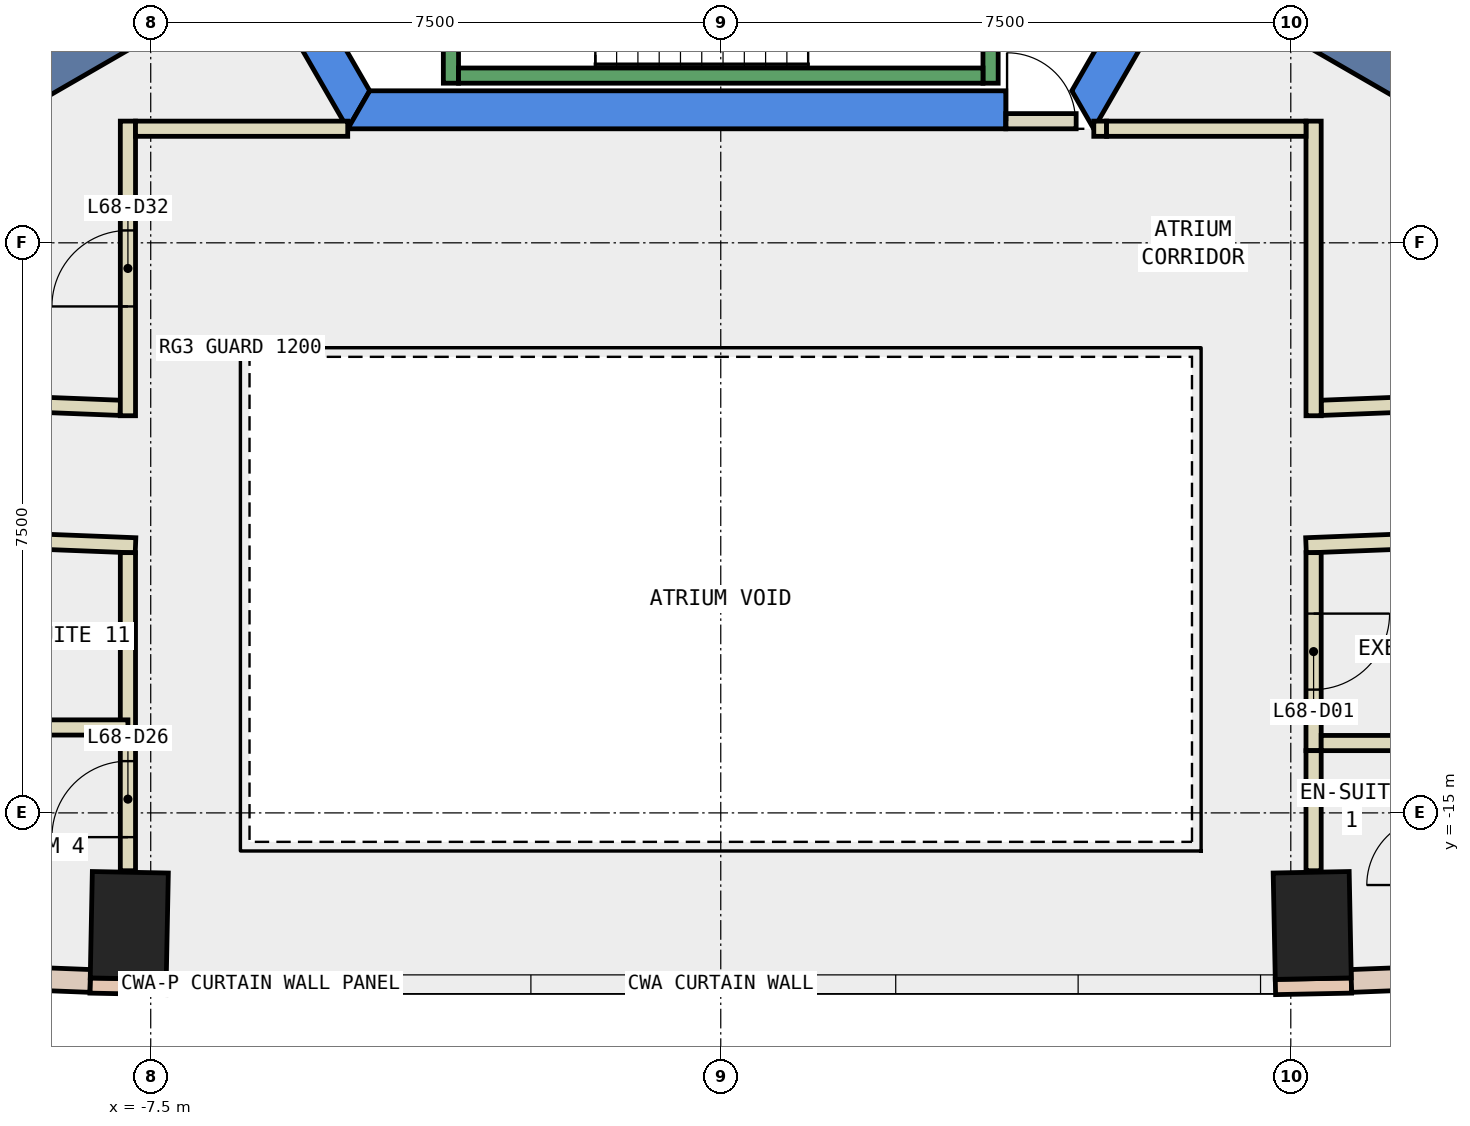
"""IFC4 building model, lengths in metres.
Left out: names, types, materials, properties, quantities, classifications, styles, units other than length and angle.
Written with IfcOpenShell. Run it as: python <this file> out.ifc"""

import sys

from ifc_helpers import new_model, si_unit, direction, frame, frame_2d, origin, origin_2d, place, context, subcontext, project, spatial, polyline, rectangle, outline, extrude, element, fill, save


model = new_model("IFC4")
c1 = context("Model", 3, precision=1e-05, world=origin(), true_north=direction((0.0, 1.0)))
c2 = subcontext(c1, "Body", "Model", "MODEL_VIEW")
j1 = project(units=[si_unit("LENGTHUNIT", "METRE"), si_unit("PLANEANGLEUNIT", "RADIAN")], contexts=[c1])
p1 = place(None, origin())
s1 = spatial("IfcSite", under=j1, at=p1, CompositionType="ELEMENT")
p2 = place(p1, origin())
s2 = spatial("IfcBuilding", under=s1, at=p2, CompositionType="ELEMENT")
p3 = place(p2, frame((0.0, 0.0, 293.6)))
s3 = spatial("IfcBuildingStorey", under=s2, at=p3, CompositionType="ELEMENT", Elevation=293.6)
for number, where, z_axis, x_axis in (
    (1, (-7.782, -16.481, -0.34), (0.0, 0.0, 1.0), (-1.0, 0.02, 0.0)),
    (2, (7.782, -16.481, -0.34), (0.0, 0.0, 1.0), (1.0, 0.02, 0.0)),
):
    element("IfcColumn", number, at=place(p3, frame(where, z_axis=z_axis, x_axis=x_axis)), inside=s3, PredefinedType="COLUMN", context=c2, shape_type="SweptSolid", body=[
        extrude(rectangle(XDim=1.0, YDim=1.4, at=origin_2d()), origin(), (0.0, 0.0, 1.0), 3.6),
    ])
p4 = place(p3, frame((0.0, 0.0, -0.34)))
e3 = element("IfcWall", 3, at=p4, inside=s3, PredefinedType="SHEAR", context=c2, shape_type="SweptSolid", body=[
    extrude(outline(polyline([(-9.815, 2.5), (-4.907, -6.0), (-4.619, -5.5), (-9.238, 2.5), (-9.815, 2.5)])), origin(), (0.0, 0.0, 1.0), 3.6),
])
p5 = place(p3, frame((0.0, 0.0, -0.34)))
e4 = element("IfcWall", 4, at=p5, inside=s3, PredefinedType="SHEAR", context=c2, shape_type="SweptSolid", body=[
    extrude(outline(polyline([(3.75, -6.0), (3.75, -5.5), (-4.619, -5.5), (-4.907, -6.0), (3.75, -6.0)])), origin(), (0.0, 0.0, 1.0), 3.6),
])
p6 = place(p3, frame((0.0, 0.0, -0.34)))
e5 = element("IfcWall", 5, at=p6, inside=s3, PredefinedType="SHEAR", context=c2, shape_type="SweptSolid", body=[
    extrude(outline(polyline([(4.907, -6.0), (9.815, 2.5), (9.238, 2.5), (4.619, -5.5), (4.907, -6.0)])), origin(), (0.0, 0.0, 1.0), 3.6),
])
for number, where, z_axis, x_axis in (
    (6, (6.279, -3.625, -0.34), (0.0, 0.0, 1.0), (0.866, -0.5, 0.0)),
    (7, (-6.279, -3.625, -0.34), (0.0, 0.0, 1.0), (-0.866, -0.5, 0.0)),
):
    element("IfcWall", number, at=place(p3, frame(where, z_axis=z_axis, x_axis=x_axis)), inside=s3, PredefinedType="SHEAR", context=c2, shape_type="SweptSolid", body=[
        extrude(rectangle(XDim=9.0, YDim=0.8, at=frame_2d((4.5, 0.0))), origin(), (0.0, 0.0, 1.0), 3.6),
    ])
for number, where, z_axis, x_axis in (
    (8, (-8.298, -17.271, 0.0), (0.0, 0.0, 1.0), (1.0, -0.02, 0.0)),
    (9, (7.298, -17.291, 0.0), (0.0, 0.0, 1.0), (1.0, 0.02, 0.0)),
):
    element("IfcWall", number, at=place(p3, frame(where, z_axis=z_axis, x_axis=x_axis)), inside=s3, PredefinedType="STANDARD", context=c2, shape_type="SweptSolid", body=[
        extrude(rectangle(XDim=1.0, YDim=0.2, at=frame_2d((0.5, 0.0))), origin(), (0.0, 0.0, 1.0), 3.26),
    ])
p7 = place(p3, frame((-11.92, -17.069, 0.0), z_axis=(0.0, 0.0, 1.0), x_axis=(0.999234893779, -0.039110446866, 0.0)))
e10 = element("IfcWall", 10, at=p7, inside=s3, PredefinedType="STANDARD", context=c2, shape_type="SweptSolid", body=[
    extrude(rectangle(XDim=3.627, YDim=0.3, at=frame_2d((1.813, 0.0))), origin(), (0.0, 0.0, 1.0), 3.26),
])
p8 = place(p7, frame((1.113, 0.0, 0.9)))
e11 = element("IfcOpeningElement", 11, at=p8, cuts=e10, PredefinedType="OPENING", context=c2, shape_type="SweptSolid", body=[
    extrude(rectangle(XDim=1.4, YDim=2.0, at=frame_2d((0.7, 1.0))), frame((0.0, 0.16, 0.0), z_axis=(0.0, -1.0, 0.0), x_axis=(1.0, 0.0, 0.0)), (0.0, 0.0, 1.0), 0.32),
])
p9 = place(p3, frame((8.296, -17.211, 0.0), z_axis=(0.0, 0.0, 1.0), x_axis=(0.999234893779, 0.039110446866, 0.0)))
e12 = element("IfcWall", 12, at=p9, inside=s3, PredefinedType="STANDARD", context=c2, shape_type="SweptSolid", body=[
    extrude(rectangle(XDim=3.627, YDim=0.3, at=frame_2d((1.813, 0.0))), origin(), (0.0, 0.0, 1.0), 3.26),
])
p10 = place(p9, frame((1.113, 0.0, 0.9)))
e13 = element("IfcOpeningElement", 13, at=p10, cuts=e12, PredefinedType="OPENING", context=c2, shape_type="SweptSolid", body=[
    extrude(rectangle(XDim=1.4, YDim=2.0, at=frame_2d((0.7, 1.0))), frame((0.0, 0.16, 0.0), z_axis=(0.0, -1.0, 0.0), x_axis=(1.0, 0.0, 0.0)), (0.0, 0.0, 1.0), 0.32),
])
p11 = place(p3, frame((7.9, -9.671, 0.0), z_axis=(0.0, 0.0, 1.0), x_axis=(0.999223751627, 0.039394088186, 0.0)))
e14 = element("IfcWall", 14, at=p11, inside=s3, PredefinedType="PARTITIONING", context=c2, shape_type="SweptSolid", body=[
    extrude(rectangle(XDim=3.347, YDim=0.2, at=frame_2d((1.673, 0.0))), origin(), (0.0, 0.0, 1.0), 3.26),
])
p12 = place(p3, frame((-10.367, -9.574, 0.0), z_axis=(0.0, 0.0, 1.0), x_axis=(0.999229139158, -0.039257196264, 0.0)))
e15 = element("IfcWall", 15, at=p12, inside=s3, PredefinedType="PARTITIONING", context=c2, shape_type="SweptSolid", body=[
    extrude(rectangle(XDim=2.469, YDim=0.2, at=frame_2d((1.234, 0.0))), origin(), (0.0, 0.0, 1.0), 3.26),
])
p13 = place(p3, frame((11.474, -11.332, 0.0), z_axis=(0.0, 0.0, 1.0), x_axis=(-0.999232546126, -0.039170381199, 0.0)))
e16 = element("IfcWall", 16, at=p13, inside=s3, PredefinedType="PARTITIONING", context=c2, shape_type="SweptSolid", body=[
    extrude(rectangle(XDim=3.777, YDim=0.2, at=frame_2d((1.889, 0.0))), origin(), (0.0, 0.0, 1.0), 3.26),
])
p14 = place(p3, frame((-7.7, -11.48, 0.0), z_axis=(0.0, 0.0, 1.0), x_axis=(-0.999233433291, 0.039147743138, 0.0)))
e17 = element("IfcWall", 17, at=p14, inside=s3, PredefinedType="PARTITIONING", context=c2, shape_type="SweptSolid", body=[
    extrude(rectangle(XDim=2.401, YDim=0.2, at=frame_2d((1.201, 0.0))), origin(), (0.0, 0.0, 1.0), 3.26),
])
p15 = place(p3, frame((4.908, -5.999, 0.0), z_axis=(0.0, 0.0, 1.0), x_axis=(1.0, 0.0, 0.0)))
e18 = element("IfcWall", 18, at=p15, inside=s3, PredefinedType="PARTITIONING", context=c2, shape_type="SweptSolid", body=[
    extrude(rectangle(XDim=0.168, YDim=0.2, at=frame_2d((0.084, 0.0))), origin(), (0.0, 0.0, 1.0), 2.4),
])
p16 = place(p3, frame((7.8, -5.899, 0.0), z_axis=(0.0, 0.0, 1.0), x_axis=(0.0, -1.0, 0.0)))
e19 = element("IfcWall", 19, at=p16, inside=s3, PredefinedType="PARTITIONING", context=c2, shape_type="SweptSolid", body=[
    extrude(rectangle(XDim=3.876, YDim=0.2, at=frame_2d((1.938, 0.0))), origin(), (0.0, 0.0, 1.0), 3.26),
])
p17 = place(p3, frame((-7.8, -9.775, 0.0), z_axis=(0.0, 0.0, 1.0), x_axis=(0.0, 1.0, 0.0)))
e20 = element("IfcWall", 20, at=p17, inside=s3, PredefinedType="PARTITIONING", context=c2, shape_type="SweptSolid", body=[
    extrude(rectangle(XDim=3.876, YDim=0.2, at=frame_2d((1.938, 0.0))), origin(), (0.0, 0.0, 1.0), 3.26),
])
p18 = place(p17, frame((1.438, 0.0, 0.0)))
e21 = element("IfcOpeningElement", 21, at=p18, cuts=e20, PredefinedType="OPENING", context=c2, shape_type="SweptSolid", body=[
    extrude(rectangle(XDim=1.0, YDim=2.1, at=frame_2d((0.5, 1.05))), frame((0.0, 0.11, 0.0), z_axis=(0.0, -1.0, 0.0), x_axis=(1.0, 0.0, 0.0)), (0.0, 0.0, 1.0), 0.22),
])
p19 = place(p3, frame((-7.7, -5.999, 0.0), z_axis=(0.0, 0.0, 1.0), x_axis=(1.0, 0.0, 0.0)))
e22 = element("IfcWall", 22, at=p19, inside=s3, PredefinedType="PARTITIONING", context=c2, shape_type="SweptSolid", body=[
    extrude(rectangle(XDim=2.792, YDim=0.2, at=frame_2d((1.396, 0.0))), origin(), (0.0, 0.0, 1.0), 3.26),
])
p20 = place(p3, frame((7.8, -11.576, 0.0), z_axis=(0.0, 0.0, 1.0), x_axis=(0.0, -1.0, 0.0)))
e23 = element("IfcWall", 23, at=p20, inside=s3, PredefinedType="PARTITIONING", context=c2, shape_type="SweptSolid", body=[
    extrude(rectangle(XDim=2.605, YDim=0.2, at=frame_2d((1.302, 0.0))), origin(), (0.0, 0.0, 1.0), 3.26),
])
p21 = place(p20, frame((0.802, 0.0, 0.0)))
e24 = element("IfcOpeningElement", 24, at=p21, cuts=e23, PredefinedType="OPENING", context=c2, shape_type="SweptSolid", body=[
    extrude(rectangle(XDim=1.0, YDim=2.1, at=frame_2d((0.5, 1.05))), frame((0.0, 0.11, 0.0), z_axis=(0.0, -1.0, 0.0), x_axis=(1.0, 0.0, 0.0)), (0.0, 0.0, 1.0), 0.22),
])
p22 = place(p3, frame((7.8, -14.181, 0.0), z_axis=(0.0, 0.0, 1.0), x_axis=(0.0, -1.0, 0.0)))
e25 = element("IfcWall", 25, at=p22, inside=s3, PredefinedType="PARTITIONING", context=c2, shape_type="SweptSolid", body=[
    extrude(rectangle(XDim=1.58, YDim=0.2, at=frame_2d((0.79, 0.0))), origin(), (0.0, 0.0, 1.0), 3.26),
])
p23 = place(p3, frame((-7.8, -15.761, 0.0), z_axis=(0.0, 0.0, 1.0), x_axis=(0.0, 1.0, 0.0)))
e26 = element("IfcWall", 26, at=p23, inside=s3, PredefinedType="PARTITIONING", context=c2, shape_type="SweptSolid", body=[
    extrude(rectangle(XDim=1.785, YDim=0.2, at=frame_2d((0.893, 0.0))), origin(), (0.0, 0.0, 1.0), 3.26),
])
p24 = place(p23, frame((0.442, 0.0, 0.0)))
e27 = element("IfcOpeningElement", 27, at=p24, cuts=e26, PredefinedType="OPENING", context=c2, shape_type="SweptSolid", body=[
    extrude(rectangle(XDim=1.0, YDim=2.1, at=frame_2d((0.5, 1.05))), frame((0.0, 0.11, 0.0), z_axis=(0.0, -1.0, 0.0), x_axis=(1.0, 0.0, 0.0)), (0.0, 0.0, 1.0), 0.22),
])
p25 = place(p3, frame((-7.8, -13.976, 0.0), z_axis=(0.0, 0.0, 1.0), x_axis=(0.0, 1.0, 0.0)))
e28 = element("IfcWall", 28, at=p25, inside=s3, PredefinedType="PARTITIONING", context=c2, shape_type="SweptSolid", body=[
    extrude(rectangle(XDim=2.4, YDim=0.2, at=frame_2d((1.2, 0.0))), origin(), (0.0, 0.0, 1.0), 3.26),
])
p26 = place(p3, frame((-6.845, -2.643, 0.0), z_axis=(0.0, 0.0, 1.0), x_axis=(-0.865994457699, -0.500053596362, 0.0)))
e29 = element("IfcWall", 29, at=p26, inside=s3, PredefinedType="PARTITIONING", context=c2, shape_type="SweptSolid", body=[
    extrude(rectangle(XDim=6.701, YDim=0.2, at=frame_2d((3.351, 0.0))), origin(), (0.0, 0.0, 1.0), 3.26),
])
p27 = place(p3, frame((9.3, -14.081, 0.0), z_axis=(0.0, 0.0, 1.0), x_axis=(-1.0, 0.0, 0.0)))
e30 = element("IfcWall", 30, at=p27, inside=s3, PredefinedType="PARTITIONING", context=c2, shape_type="SweptSolid", body=[
    extrude(rectangle(XDim=1.4, YDim=0.2, at=frame_2d((0.7, 0.0))), origin(), (0.0, 0.0, 1.0), 3.26),
])
p28 = place(p3, frame((-10.1, -13.876, 0.0), z_axis=(0.0, 0.0, 1.0), x_axis=(1.0, 0.0, 0.0)))
e31 = element("IfcWall", 31, at=p28, inside=s3, PredefinedType="PARTITIONING", context=c2, shape_type="SweptSolid", body=[
    extrude(rectangle(XDim=2.3, YDim=0.2, at=frame_2d((1.15, 0.0))), origin(), (0.0, 0.0, 1.0), 3.26),
])
p29 = place(p3, frame((3.75, -5.9, 0.0), z_axis=(0.0, 0.0, 1.0), x_axis=(1.0, 0.0, 0.0)))
e32 = element("IfcWall", 32, at=p29, inside=s3, PredefinedType="PARTITIONING", context=c2, shape_type="SweptSolid", body=[
    extrude(rectangle(XDim=0.926, YDim=0.2, at=frame_2d((0.463, 0.0))), origin(), (0.0, 0.0, 1.0), 2.4),
])
p30 = place(p29, frame((0.017, 0.0, 0.0)))
e33 = element("IfcOpeningElement", 33, at=p30, cuts=e32, PredefinedType="OPENING", context=c2, shape_type="SweptSolid", body=[
    extrude(rectangle(XDim=0.9, YDim=2.1, at=frame_2d((0.45, 1.05))), frame((0.0, 0.11, 0.0), z_axis=(0.0, -1.0, 0.0), x_axis=(1.0, 0.0, 0.0)), (0.0, 0.0, 1.0), 0.22),
])
p31 = place(p3, frame((5.076, -5.999, 0.0), z_axis=(0.0, 0.0, 1.0), x_axis=(1.0, 0.0, 0.0)))
e34 = element("IfcWall", 34, at=p31, inside=s3, PredefinedType="PARTITIONING", context=c2, shape_type="SweptSolid", body=[
    extrude(rectangle(XDim=2.624, YDim=0.2, at=frame_2d((1.312, 0.0))), origin(), (0.0, 0.0, 1.0), 3.26),
])
p32 = place(p3, frame((-3.55, -1.0, 0.0), z_axis=(0.0, 0.0, 1.0), x_axis=(0.0, -1.0, 0.0)))
e35 = element("IfcWall", 35, at=p32, inside=s3, PredefinedType="STANDARD", context=c2, shape_type="SweptSolid", body=[
    extrude(rectangle(XDim=4.4, YDim=0.2, at=frame_2d((2.2, 0.0))), origin(), (0.0, 0.0, 1.0), 3.26),
])
p33 = place(p32, frame((2.4, 0.0, 0.0)))
e36 = element("IfcOpeningElement", 36, at=p33, cuts=e35, PredefinedType="OPENING", context=c2, shape_type="SweptSolid", body=[
    extrude(rectangle(XDim=1.1, YDim=2.2, at=frame_2d((0.55, 1.1))), frame((0.0, 0.11, 0.0), z_axis=(0.0, -1.0, 0.0), x_axis=(1.0, 0.0, 0.0)), (0.0, 0.0, 1.0), 0.22),
])
p34 = place(p3, frame((3.55, -2.667, 0.0), z_axis=(0.0, 0.0, 1.0), x_axis=(0.0, -1.0, 0.0)))
e37 = element("IfcWall", 37, at=p34, inside=s3, PredefinedType="STANDARD", context=c2, shape_type="SweptSolid", body=[
    extrude(rectangle(XDim=2.733, YDim=0.2, at=frame_2d((1.366, 0.0))), origin(), (0.0, 0.0, 1.0), 3.26),
])
p35 = place(p3, frame((-3.45, -5.3, 0.0), z_axis=(0.0, 0.0, 1.0), x_axis=(1.0, 0.0, 0.0)))
e38 = element("IfcWall", 38, at=p35, inside=s3, PredefinedType="STANDARD", context=c2, shape_type="SweptSolid", body=[
    extrude(rectangle(XDim=6.9, YDim=0.2, at=frame_2d((3.45, 0.0))), origin(), (0.0, 0.0, 1.0), 3.26),
])
p36 = place(p21, origin())
e39 = element("IfcDoor", 39, at=p36, inside=s3, OperationType="SINGLE_SWING_LEFT", PredefinedType="DOOR", context=c2, shape_type="SweptSolid", body=[
    extrude(rectangle(XDim=1.0, YDim=2.1, at=frame_2d((0.5, 1.05))), frame((0.0, 0.025, 0.0), z_axis=(0.0, -1.0, 0.0), x_axis=(1.0, 0.0, 0.0)), (0.0, 0.0, 1.0), 0.05),
])
fill(e24, e39)
p37 = place(p24, origin())
e40 = element("IfcDoor", 40, at=p37, inside=s3, OperationType="SINGLE_SWING_RIGHT", PredefinedType="DOOR", context=c2, shape_type="SweptSolid", body=[
    extrude(rectangle(XDim=1.0, YDim=2.1, at=frame_2d((0.5, 1.05))), frame((0.0, 0.025, 0.0), z_axis=(0.0, -1.0, 0.0), x_axis=(1.0, 0.0, 0.0)), (0.0, 0.0, 1.0), 0.05),
])
fill(e27, e40)
p38 = place(p18, origin())
e41 = element("IfcDoor", 41, at=p38, inside=s3, OperationType="SINGLE_SWING_LEFT", PredefinedType="DOOR", context=c2, shape_type="SweptSolid", body=[
    extrude(rectangle(XDim=1.0, YDim=2.1, at=frame_2d((0.5, 1.05))), frame((0.0, 0.025, 0.0), z_axis=(0.0, -1.0, 0.0), x_axis=(1.0, 0.0, 0.0)), (0.0, 0.0, 1.0), 0.05),
])
fill(e21, e41)
p39 = place(p30, origin())
e42 = element("IfcDoor", 42, at=p39, inside=s3, OperationType="SINGLE_SWING_LEFT", PredefinedType="DOOR", context=c2, shape_type="SweptSolid", body=[
    extrude(rectangle(XDim=0.9, YDim=2.1, at=frame_2d((0.45, 1.05))), frame((0.0, 0.025, 0.0), z_axis=(0.0, -1.0, 0.0), x_axis=(1.0, 0.0, 0.0)), (0.0, 0.0, 1.0), 0.05),
])
fill(e33, e42)
save(model, sys.argv[1])
